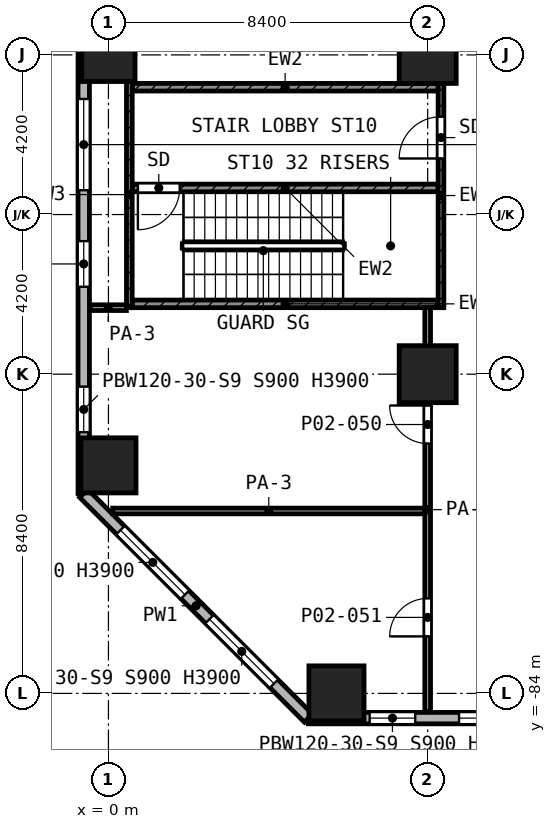
"""IFC4 building model, lengths in metres.
Left out: names, types, materials, properties, quantities, classifications, styles, units other than length and angle.
Written with IfcOpenShell. Run it as: python <this file> out.ifc"""

import sys

from ifc_helpers import new_model, si_unit, direction, frame, frame_2d, origin, origin_2d, place, context, subcontext, project, spatial, rectangle, extrude, element, fill, save


model = new_model("IFC4")
c1 = context("Model", 3, precision=1e-05, world=origin(), true_north=direction((0.0, 1.0)))
c2 = subcontext(c1, "Body", "Model", "MODEL_VIEW")
j1 = project(units=[si_unit("LENGTHUNIT", "METRE"), si_unit("PLANEANGLEUNIT", "RADIAN")], contexts=[c1])
p1 = place(None, origin())
s1 = spatial("IfcSite", under=j1, at=p1, CompositionType="ELEMENT")
p2 = place(p1, origin())
s2 = spatial("IfcBuilding", under=s1, at=p2, CompositionType="ELEMENT")
p3 = place(p2, frame((0.0, 0.0, 7.0)))
s3 = spatial("IfcBuildingStorey", under=s2, at=p3, CompositionType="ELEMENT", Elevation=7.0)
p4 = place(p3, frame((0.0, -67.2, 0.0), z_axis=(0.0, 0.0, 1.0), x_axis=(1.0, 0.0, 0.0)))
e1 = element("IfcColumn", 1, at=p4, inside=s3, PredefinedType="COLUMN", context=c2, shape_type="SweptSolid", body=[
    extrude(rectangle(XDim=1.4, YDim=1.4, at=origin_2d()), origin(), (0.0, 0.0, 1.0), 5.6),
])
for number, where, z_axis, x_axis in (
    (2, (8.4, -67.2, 0.0), (0.0, 0.0, 1.0), (1.0, 0.0, 0.0)),
    (3, (8.4, -75.6, 0.0), (0.0, 0.0, 1.0), (1.0, 0.0, 0.0)),
):
    element("IfcColumn", number, at=place(p3, frame(where, z_axis=z_axis, x_axis=x_axis)), inside=s3, PredefinedType="COLUMN", context=c2, shape_type="SweptSolid", body=[
        extrude(rectangle(XDim=1.5, YDim=1.5, at=origin_2d()), origin(), (0.0, 0.0, 1.0), 5.6),
    ])
for number, where, z_axis, x_axis in (
    (4, (0.0, -78.0, 0.0), (0.0, 0.0, 1.0), (1.0, 0.0, 0.0)),
    (5, (6.0, -84.0, 0.0), (0.0, 0.0, 1.0), (1.0, 0.0, 0.0)),
):
    element("IfcColumn", number, at=place(p3, frame(where, z_axis=z_axis, x_axis=x_axis)), inside=s3, PredefinedType="COLUMN", context=c2, shape_type="SweptSolid", body=[
        extrude(rectangle(XDim=1.45, YDim=1.45, at=origin_2d()), origin(), (0.0, 0.0, 1.0), 5.6),
    ])
p5 = place(p3, frame((-0.65, -5.262, 0.0), z_axis=(0.0, 0.0, 1.0), x_axis=(0.0, -1.0, 0.0)))
e6 = element("IfcWall", 6, at=p5, inside=s3, PredefinedType="SOLIDWALL", context=c2, shape_type="SweptSolid", body=[
    extrude(rectangle(XDim=73.476, YDim=0.3, at=frame_2d((36.738, 0.0))), origin(), (0.0, 0.0, 1.0), 5.25),
])
p6 = place(p5, frame((1.61, 0.0, 0.9)))
e7 = element("IfcOpeningElement", 7, at=p6, cuts=e6, PredefinedType="OPENING", context=c2, shape_type="SweptSolid", body=[
    extrude(rectangle(XDim=1.2, YDim=3.0, at=frame_2d((0.6, 1.5))), frame((0.0, 0.16, 0.0), z_axis=(0.0, -1.0, 0.0), x_axis=(1.0, 0.0, 0.0)), (0.0, 0.0, 1.0), 0.32),
])
p7 = place(p5, frame((4.123, 0.0, 0.9)))
e8 = element("IfcOpeningElement", 8, at=p7, cuts=e6, PredefinedType="OPENING", context=c2, shape_type="SweptSolid", body=[
    extrude(rectangle(XDim=2.4, YDim=3.0, at=frame_2d((1.2, 1.5))), frame((0.0, 0.16, 0.0), z_axis=(0.0, -1.0, 0.0), x_axis=(1.0, 0.0, 0.0)), (0.0, 0.0, 1.0), 0.32),
])
p8 = place(p5, frame((7.978, 0.0, 0.9)))
e9 = element("IfcOpeningElement", 9, at=p8, cuts=e6, PredefinedType="OPENING", context=c2, shape_type="SweptSolid", body=[
    extrude(rectangle(XDim=2.4, YDim=3.0, at=frame_2d((1.2, 1.5))), frame((0.0, 0.16, 0.0), z_axis=(0.0, -1.0, 0.0), x_axis=(1.0, 0.0, 0.0)), (0.0, 0.0, 1.0), 0.32),
])
p9 = place(p5, frame((12.698, 0.0, 0.9)))
e10 = element("IfcOpeningElement", 10, at=p9, cuts=e6, PredefinedType="OPENING", context=c2, shape_type="SweptSolid", body=[
    extrude(rectangle(XDim=2.4, YDim=3.0, at=frame_2d((1.2, 1.5))), frame((0.0, 0.16, 0.0), z_axis=(0.0, -1.0, 0.0), x_axis=(1.0, 0.0, 0.0)), (0.0, 0.0, 1.0), 0.32),
])
p10 = place(p5, frame((16.378, 0.0, 0.9)))
e11 = element("IfcOpeningElement", 11, at=p10, cuts=e6, PredefinedType="OPENING", context=c2, shape_type="SweptSolid", body=[
    extrude(rectangle(XDim=2.4, YDim=3.0, at=frame_2d((1.2, 1.5))), frame((0.0, 0.16, 0.0), z_axis=(0.0, -1.0, 0.0), x_axis=(1.0, 0.0, 0.0)), (0.0, 0.0, 1.0), 0.32),
])
p11 = place(p5, frame((21.098, 0.0, 0.9)))
e12 = element("IfcOpeningElement", 12, at=p11, cuts=e6, PredefinedType="OPENING", context=c2, shape_type="SweptSolid", body=[
    extrude(rectangle(XDim=2.4, YDim=3.0, at=frame_2d((1.2, 1.5))), frame((0.0, 0.16, 0.0), z_axis=(0.0, -1.0, 0.0), x_axis=(1.0, 0.0, 0.0)), (0.0, 0.0, 1.0), 0.32),
])
p12 = place(p5, frame((24.863, 0.0, 0.9)))
e13 = element("IfcOpeningElement", 13, at=p12, cuts=e6, PredefinedType="OPENING", context=c2, shape_type="SweptSolid", body=[
    extrude(rectangle(XDim=2.4, YDim=3.0, at=frame_2d((1.2, 1.5))), frame((0.0, 0.16, 0.0), z_axis=(0.0, -1.0, 0.0), x_axis=(1.0, 0.0, 0.0)), (0.0, 0.0, 1.0), 0.32),
])
p13 = place(p5, frame((29.623, 0.0, 0.9)))
e14 = element("IfcOpeningElement", 14, at=p13, cuts=e6, PredefinedType="OPENING", context=c2, shape_type="SweptSolid", body=[
    extrude(rectangle(XDim=2.4, YDim=3.0, at=frame_2d((1.2, 1.5))), frame((0.0, 0.16, 0.0), z_axis=(0.0, -1.0, 0.0), x_axis=(1.0, 0.0, 0.0)), (0.0, 0.0, 1.0), 0.32),
])
p14 = place(p5, frame((33.178, 0.0, 0.9)))
e15 = element("IfcOpeningElement", 15, at=p14, cuts=e6, PredefinedType="OPENING", context=c2, shape_type="SweptSolid", body=[
    extrude(rectangle(XDim=2.4, YDim=3.0, at=frame_2d((1.2, 1.5))), frame((0.0, 0.16, 0.0), z_axis=(0.0, -1.0, 0.0), x_axis=(1.0, 0.0, 0.0)), (0.0, 0.0, 1.0), 0.32),
])
p15 = place(p5, frame((37.898, 0.0, 0.9)))
e16 = element("IfcOpeningElement", 16, at=p15, cuts=e6, PredefinedType="OPENING", context=c2, shape_type="SweptSolid", body=[
    extrude(rectangle(XDim=2.4, YDim=3.0, at=frame_2d((1.2, 1.5))), frame((0.0, 0.16, 0.0), z_axis=(0.0, -1.0, 0.0), x_axis=(1.0, 0.0, 0.0)), (0.0, 0.0, 1.0), 0.32),
])
p16 = place(p5, frame((41.578, 0.0, 0.9)))
e17 = element("IfcOpeningElement", 17, at=p16, cuts=e6, PredefinedType="OPENING", context=c2, shape_type="SweptSolid", body=[
    extrude(rectangle(XDim=2.4, YDim=3.0, at=frame_2d((1.2, 1.5))), frame((0.0, 0.16, 0.0), z_axis=(0.0, -1.0, 0.0), x_axis=(1.0, 0.0, 0.0)), (0.0, 0.0, 1.0), 0.32),
])
p17 = place(p5, frame((46.298, 0.0, 0.9)))
e18 = element("IfcOpeningElement", 18, at=p17, cuts=e6, PredefinedType="OPENING", context=c2, shape_type="SweptSolid", body=[
    extrude(rectangle(XDim=2.4, YDim=3.0, at=frame_2d((1.2, 1.5))), frame((0.0, 0.16, 0.0), z_axis=(0.0, -1.0, 0.0), x_axis=(1.0, 0.0, 0.0)), (0.0, 0.0, 1.0), 0.32),
])
p18 = place(p5, frame((50.213, 0.0, 0.9)))
e19 = element("IfcOpeningElement", 19, at=p18, cuts=e6, PredefinedType="OPENING", context=c2, shape_type="SweptSolid", body=[
    extrude(rectangle(XDim=2.4, YDim=3.0, at=frame_2d((1.2, 1.5))), frame((0.0, 0.16, 0.0), z_axis=(0.0, -1.0, 0.0), x_axis=(1.0, 0.0, 0.0)), (0.0, 0.0, 1.0), 0.32),
])
p19 = place(p5, frame((54.613, 0.0, 0.9)))
e20 = element("IfcOpeningElement", 20, at=p19, cuts=e6, PredefinedType="OPENING", context=c2, shape_type="SweptSolid", body=[
    extrude(rectangle(XDim=2.4, YDim=3.0, at=frame_2d((1.2, 1.5))), frame((0.0, 0.16, 0.0), z_axis=(0.0, -1.0, 0.0), x_axis=(1.0, 0.0, 0.0)), (0.0, 0.0, 1.0), 0.32),
])
p20 = place(p5, frame((58.378, 0.0, 0.9)))
e21 = element("IfcOpeningElement", 21, at=p20, cuts=e6, PredefinedType="OPENING", context=c2, shape_type="SweptSolid", body=[
    extrude(rectangle(XDim=2.4, YDim=3.0, at=frame_2d((1.2, 1.5))), frame((0.0, 0.16, 0.0), z_axis=(0.0, -1.0, 0.0), x_axis=(1.0, 0.0, 0.0)), (0.0, 0.0, 1.0), 0.32),
])
p21 = place(p5, frame((63.098, 0.0, 0.9)))
e22 = element("IfcOpeningElement", 22, at=p21, cuts=e6, PredefinedType="OPENING", context=c2, shape_type="SweptSolid", body=[
    extrude(rectangle(XDim=2.4, YDim=3.0, at=frame_2d((1.2, 1.5))), frame((0.0, 0.16, 0.0), z_axis=(0.0, -1.0, 0.0), x_axis=(1.0, 0.0, 0.0)), (0.0, 0.0, 1.0), 0.32),
])
p22 = place(p5, frame((66.838, 0.0, 0.9)))
e23 = element("IfcOpeningElement", 23, at=p22, cuts=e6, PredefinedType="OPENING", context=c2, shape_type="SweptSolid", body=[
    extrude(rectangle(XDim=1.2, YDim=3.0, at=frame_2d((0.6, 1.5))), frame((0.0, 0.16, 0.0), z_axis=(0.0, -1.0, 0.0), x_axis=(1.0, 0.0, 0.0)), (0.0, 0.0, 1.0), 0.32),
])
p23 = place(p5, frame((70.665, 0.0, 0.9)))
e24 = element("IfcOpeningElement", 24, at=p23, cuts=e6, PredefinedType="OPENING", context=c2, shape_type="SweptSolid", body=[
    extrude(rectangle(XDim=1.2, YDim=3.0, at=frame_2d((0.6, 1.5))), frame((0.0, 0.16, 0.0), z_axis=(0.0, -1.0, 0.0), x_axis=(1.0, 0.0, 0.0)), (0.0, 0.0, 1.0), 0.32),
])
p24 = place(p3, frame((-0.65, -78.738, 0.0), z_axis=(0.0, 0.0, 1.0), x_axis=(0.707106781187, -0.707106781187, 0.0)))
e25 = element("IfcWall", 25, at=p24, inside=s3, PredefinedType="SOLIDWALL", context=c2, shape_type="SweptSolid", body=[
    extrude(rectangle(XDim=8.361, YDim=0.3, at=frame_2d((4.181, 0.0))), origin(), (0.0, 0.0, 1.0), 5.25),
])
p25 = place(p24, frame((1.367, 0.0, 0.9)))
e26 = element("IfcOpeningElement", 26, at=p25, cuts=e25, PredefinedType="OPENING", context=c2, shape_type="SweptSolid", body=[
    extrude(rectangle(XDim=2.4, YDim=3.0, at=frame_2d((1.2, 1.5))), frame((0.0, 0.16, 0.0), z_axis=(0.0, -1.0, 0.0), x_axis=(1.0, 0.0, 0.0)), (0.0, 0.0, 1.0), 0.32),
])
p26 = place(p24, frame((4.679, 0.0, 0.9)))
e27 = element("IfcOpeningElement", 27, at=p26, cuts=e25, PredefinedType="OPENING", context=c2, shape_type="SweptSolid", body=[
    extrude(rectangle(XDim=2.4, YDim=3.0, at=frame_2d((1.2, 1.5))), frame((0.0, 0.16, 0.0), z_axis=(0.0, -1.0, 0.0), x_axis=(1.0, 0.0, 0.0)), (0.0, 0.0, 1.0), 0.32),
])
p27 = place(p3, frame((5.262, -84.65, 0.0), z_axis=(0.0, 0.0, 1.0), x_axis=(1.0, 0.0, 0.0)))
e28 = element("IfcWall", 28, at=p27, inside=s3, PredefinedType="SOLIDWALL", context=c2, shape_type="SweptSolid", body=[
    extrude(rectangle(XDim=23.076, YDim=0.3, at=frame_2d((11.538, 0.0))), origin(), (0.0, 0.0, 1.0), 5.25),
])
p28 = place(p27, frame((1.61, 0.0, 0.9)))
e29 = element("IfcOpeningElement", 29, at=p28, cuts=e28, PredefinedType="OPENING", context=c2, shape_type="SweptSolid", body=[
    extrude(rectangle(XDim=1.2, YDim=3.0, at=frame_2d((0.6, 1.5))), frame((0.0, 0.16, 0.0), z_axis=(0.0, -1.0, 0.0), x_axis=(1.0, 0.0, 0.0)), (0.0, 0.0, 1.0), 0.32),
])
p29 = place(p27, frame((3.963, 0.0, 0.9)))
e30 = element("IfcOpeningElement", 30, at=p29, cuts=e28, PredefinedType="OPENING", context=c2, shape_type="SweptSolid", body=[
    extrude(rectangle(XDim=1.2, YDim=3.0, at=frame_2d((0.6, 1.5))), frame((0.0, 0.16, 0.0), z_axis=(0.0, -1.0, 0.0), x_axis=(1.0, 0.0, 0.0)), (0.0, 0.0, 1.0), 0.32),
])
p30 = place(p27, frame((7.978, 0.0, 0.9)))
e31 = element("IfcOpeningElement", 31, at=p30, cuts=e28, PredefinedType="OPENING", context=c2, shape_type="SweptSolid", body=[
    extrude(rectangle(XDim=2.4, YDim=3.0, at=frame_2d((1.2, 1.5))), frame((0.0, 0.16, 0.0), z_axis=(0.0, -1.0, 0.0), x_axis=(1.0, 0.0, 0.0)), (0.0, 0.0, 1.0), 0.32),
])
p31 = place(p27, frame((12.698, 0.0, 0.9)))
e32 = element("IfcOpeningElement", 32, at=p31, cuts=e28, PredefinedType="OPENING", context=c2, shape_type="SweptSolid", body=[
    extrude(rectangle(XDim=2.4, YDim=3.0, at=frame_2d((1.2, 1.5))), frame((0.0, 0.16, 0.0), z_axis=(0.0, -1.0, 0.0), x_axis=(1.0, 0.0, 0.0)), (0.0, 0.0, 1.0), 0.32),
])
p32 = place(p27, frame((16.038, 0.0, 0.9)))
e33 = element("IfcOpeningElement", 33, at=p32, cuts=e28, PredefinedType="OPENING", context=c2, shape_type="SweptSolid", body=[
    extrude(rectangle(XDim=3.6, YDim=3.0, at=frame_2d((1.8, 1.5))), frame((0.0, 0.16, 0.0), z_axis=(0.0, -1.0, 0.0), x_axis=(1.0, 0.0, 0.0)), (0.0, 0.0, 1.0), 0.32),
])
p33 = place(p27, frame((20.265, 0.0, 0.9)))
e34 = element("IfcOpeningElement", 34, at=p33, cuts=e28, PredefinedType="OPENING", context=c2, shape_type="SweptSolid", body=[
    extrude(rectangle(XDim=1.2, YDim=3.0, at=frame_2d((0.6, 1.5))), frame((0.0, 0.16, 0.0), z_axis=(0.0, -1.0, 0.0), x_axis=(1.0, 0.0, 0.0)), (0.0, 0.0, 1.0), 0.32),
])
p34 = place(p3, frame((0.55, -73.85, 0.0), z_axis=(0.0, 0.0, 1.0), x_axis=(0.0, 1.0, 0.0)))
e35 = element("IfcWall", 35, at=p34, inside=s3, PredefinedType="SHEAR", context=c2, shape_type="SweptSolid", body=[
    extrude(rectangle(XDim=5.95, YDim=0.15, at=frame_2d((2.975, 0.0))), origin(), (0.0, 0.0, 1.0), 5.25),
])
p35 = place(p3, frame((8.75, -73.85, 0.0), z_axis=(0.0, 0.0, 1.0), x_axis=(0.0, 1.0, 0.0)))
e36 = element("IfcWall", 36, at=p35, inside=s3, PredefinedType="SHEAR", context=c2, shape_type="SweptSolid", body=[
    extrude(rectangle(XDim=5.9, YDim=0.15, at=frame_2d((2.95, 0.0))), origin(), (0.0, 0.0, 1.0), 5.25),
])
p36 = place(p35, frame((3.925, 0.0, 0.0)))
e37 = element("IfcOpeningElement", 37, at=p36, cuts=e36, PredefinedType="OPENING", context=c2, shape_type="SweptSolid", body=[
    extrude(rectangle(XDim=1.1, YDim=2.1, at=frame_2d((0.55, 1.05))), frame((0.0, 0.085, 0.0), z_axis=(0.0, -1.0, 0.0), x_axis=(1.0, 0.0, 0.0)), (0.0, 0.0, 1.0), 0.17),
])
p37 = place(p3, frame((0.625, -73.75, 0.0), z_axis=(0.0, 0.0, 1.0), x_axis=(1.0, 0.0, 0.0)))
e38 = element("IfcWall", 38, at=p37, inside=s3, PredefinedType="SHEAR", context=c2, shape_type="SweptSolid", body=[
    extrude(rectangle(XDim=8.05, YDim=0.2, at=frame_2d((4.025, 0.0))), origin(), (0.0, 0.0, 1.0), 5.25),
])
p38 = place(p3, frame((0.625, -70.7, 0.0), z_axis=(0.0, 0.0, 1.0), x_axis=(1.0, 0.0, 0.0)))
e39 = element("IfcWall", 39, at=p38, inside=s3, PredefinedType="SHEAR", context=c2, shape_type="SweptSolid", body=[
    extrude(rectangle(XDim=8.05, YDim=0.2, at=frame_2d((4.025, 0.0))), origin(), (0.0, 0.0, 1.0), 5.25),
])
p39 = place(p38, frame((0.15, 0.0, 0.0)))
e40 = element("IfcOpeningElement", 40, at=p39, cuts=e39, PredefinedType="OPENING", context=c2, shape_type="SweptSolid", body=[
    extrude(rectangle(XDim=1.1, YDim=2.1, at=frame_2d((0.55, 1.05))), frame((0.0, 0.11, 0.0), z_axis=(0.0, -1.0, 0.0), x_axis=(1.0, 0.0, 0.0)), (0.0, 0.0, 1.0), 0.22),
])
p40 = place(p3, frame((0.625, -68.05, 0.0), z_axis=(0.0, 0.0, 1.0), x_axis=(1.0, 0.0, 0.0)))
e41 = element("IfcWall", 41, at=p40, inside=s3, PredefinedType="SHEAR", context=c2, shape_type="SweptSolid", body=[
    extrude(rectangle(XDim=8.05, YDim=0.2, at=frame_2d((4.025, 0.0))), origin(), (0.0, 0.0, 1.0), 5.25),
])
p41 = place(p3, frame((0.113, -79.2, 0.0), z_axis=(0.0, 0.0, 1.0), x_axis=(1.0, 0.0, 0.0)))
e42 = element("IfcWall", 42, at=p41, inside=s3, PredefinedType="PARTITIONING", context=c2, shape_type="SweptSolid", body=[
    extrude(rectangle(XDim=8.212, YDim=0.15, at=frame_2d((4.106, 0.0))), origin(), (0.0, 0.0, 1.0), 3.85),
])
p42 = place(p3, frame((-0.48, -73.85, 0.0), z_axis=(0.0, 0.0, 1.0), x_axis=(1.0, 0.0, 0.0)))
e43 = element("IfcWall", 43, at=p42, inside=s3, PredefinedType="PARTITIONING", context=c2, shape_type="SweptSolid", body=[
    extrude(rectangle(XDim=0.953, YDim=0.15, at=frame_2d((0.477, 0.0))), origin(), (0.0, 0.0, 1.0), 3.85),
])
p43 = place(p3, frame((8.4, -84.48, 0.0), z_axis=(0.0, 0.0, 1.0), x_axis=(0.0, 1.0, 0.0)))
e44 = element("IfcWall", 44, at=p43, inside=s3, PredefinedType="PARTITIONING", context=c2, shape_type="SweptSolid", body=[
    extrude(rectangle(XDim=10.63, YDim=0.15, at=frame_2d((5.315, 0.0))), origin(), (0.0, 0.0, 1.0), 3.85),
])
p44 = place(p43, frame((7.055, 0.0, 0.0)))
e45 = element("IfcOpeningElement", 45, at=p44, cuts=e44, PredefinedType="OPENING", context=c2, shape_type="SweptSolid", body=[
    extrude(rectangle(XDim=1.0, YDim=2.1, at=frame_2d((0.5, 1.05))), frame((0.0, 0.085, 0.0), z_axis=(0.0, -1.0, 0.0), x_axis=(1.0, 0.0, 0.0)), (0.0, 0.0, 1.0), 0.17),
])
p45 = place(p43, frame((1.98, 0.0, 0.0)))
e46 = element("IfcOpeningElement", 46, at=p45, cuts=e44, PredefinedType="OPENING", context=c2, shape_type="SweptSolid", body=[
    extrude(rectangle(XDim=1.0, YDim=2.1, at=frame_2d((0.5, 1.05))), frame((0.0, 0.085, 0.0), z_axis=(0.0, -1.0, 0.0), x_axis=(1.0, 0.0, 0.0)), (0.0, 0.0, 1.0), 0.17),
])
p46 = place(p3, frame((8.4, -67.947, 0.0), z_axis=(0.0, 0.0, 1.0), x_axis=(0.0, 1.0, 0.0)))
e47 = element("IfcWall", 47, at=p46, inside=s3, PredefinedType="PARTITIONING", context=c2, shape_type="SweptSolid", body=[
    extrude(rectangle(XDim=25.597, YDim=0.15, at=frame_2d((12.798, 0.0))), origin(), (0.0, 0.0, 1.0), 5.25),
])
p47 = place(p46, frame((19.147, 0.0, 0.0)))
e48 = element("IfcOpeningElement", 48, at=p47, cuts=e47, PredefinedType="OPENING", context=c2, shape_type="SweptSolid", body=[
    extrude(rectangle(XDim=1.0, YDim=2.1, at=frame_2d((0.5, 1.05))), frame((0.0, 0.085, 0.0), z_axis=(0.0, -1.0, 0.0), x_axis=(1.0, 0.0, 0.0)), (0.0, 0.0, 1.0), 0.17),
])
p48 = place(p46, frame((14.647, 0.0, 0.0)))
e49 = element("IfcOpeningElement", 49, at=p48, cuts=e47, PredefinedType="OPENING", context=c2, shape_type="SweptSolid", body=[
    extrude(rectangle(XDim=1.0, YDim=2.1, at=frame_2d((0.5, 1.05))), frame((0.0, 0.085, 0.0), z_axis=(0.0, -1.0, 0.0), x_axis=(1.0, 0.0, 0.0)), (0.0, 0.0, 1.0), 0.17),
])
p49 = place(p46, frame((10.447, 0.0, 0.0)))
e50 = element("IfcOpeningElement", 50, at=p49, cuts=e47, PredefinedType="OPENING", context=c2, shape_type="SweptSolid", body=[
    extrude(rectangle(XDim=1.0, YDim=2.1, at=frame_2d((0.5, 1.05))), frame((0.0, 0.085, 0.0), z_axis=(0.0, -1.0, 0.0), x_axis=(1.0, 0.0, 0.0)), (0.0, 0.0, 1.0), 0.17),
])
p50 = place(p46, frame((6.697, 0.0, 0.0)))
e51 = element("IfcOpeningElement", 51, at=p50, cuts=e47, PredefinedType="OPENING", context=c2, shape_type="SweptSolid", body=[
    extrude(rectangle(XDim=1.0, YDim=2.1, at=frame_2d((0.5, 1.05))), frame((0.0, 0.085, 0.0), z_axis=(0.0, -1.0, 0.0), x_axis=(1.0, 0.0, 0.0)), (0.0, 0.0, 1.0), 0.17),
])
p51 = place(p46, frame((2.124, 0.0, 0.0)))
e52 = element("IfcOpeningElement", 52, at=p51, cuts=e47, PredefinedType="OPENING", context=c2, shape_type="SweptSolid", body=[
    extrude(rectangle(XDim=1.0, YDim=2.1, at=frame_2d((0.5, 1.05))), frame((0.0, 0.085, 0.0), z_axis=(0.0, -1.0, 0.0), x_axis=(1.0, 0.0, 0.0)), (0.0, 0.0, 1.0), 0.17),
])
p52 = place(p21, origin())
e53 = element("IfcWindow", 53, at=p52, inside=s3, PartitioningType="SINGLE_PANEL", PredefinedType="WINDOW", context=c2, shape_type="SweptSolid", body=[
    extrude(rectangle(XDim=2.4, YDim=3.0, at=frame_2d((1.2, 1.5))), frame((0.0, 0.03, 0.0), z_axis=(0.0, -1.0, 0.0), x_axis=(1.0, 0.0, 0.0)), (0.0, 0.0, 1.0), 0.06),
])
fill(e22, e53)
p53 = place(p22, origin())
e54 = element("IfcWindow", 54, at=p53, inside=s3, PartitioningType="SINGLE_PANEL", PredefinedType="WINDOW", context=c2, shape_type="SweptSolid", body=[
    extrude(rectangle(XDim=1.2, YDim=3.0, at=frame_2d((0.6, 1.5))), frame((0.0, 0.03, 0.0), z_axis=(0.0, -1.0, 0.0), x_axis=(1.0, 0.0, 0.0)), (0.0, 0.0, 1.0), 0.06),
])
fill(e23, e54)
p54 = place(p23, origin())
e55 = element("IfcWindow", 55, at=p54, inside=s3, PartitioningType="SINGLE_PANEL", PredefinedType="WINDOW", context=c2, shape_type="SweptSolid", body=[
    extrude(rectangle(XDim=1.2, YDim=3.0, at=frame_2d((0.6, 1.5))), frame((0.0, 0.03, 0.0), z_axis=(0.0, -1.0, 0.0), x_axis=(1.0, 0.0, 0.0)), (0.0, 0.0, 1.0), 0.06),
])
fill(e24, e55)
p55 = place(p25, origin())
e56 = element("IfcWindow", 56, at=p55, inside=s3, PartitioningType="SINGLE_PANEL", PredefinedType="WINDOW", context=c2, shape_type="SweptSolid", body=[
    extrude(rectangle(XDim=2.4, YDim=3.0, at=frame_2d((1.2, 1.5))), frame((0.0, 0.03, 0.0), z_axis=(0.0, -1.0, 0.0), x_axis=(1.0, 0.0, 0.0)), (0.0, 0.0, 1.0), 0.06),
])
fill(e26, e56)
p56 = place(p26, origin())
e57 = element("IfcWindow", 57, at=p56, inside=s3, PartitioningType="SINGLE_PANEL", PredefinedType="WINDOW", context=c2, shape_type="SweptSolid", body=[
    extrude(rectangle(XDim=2.4, YDim=3.0, at=frame_2d((1.2, 1.5))), frame((0.0, 0.03, 0.0), z_axis=(0.0, -1.0, 0.0), x_axis=(1.0, 0.0, 0.0)), (0.0, 0.0, 1.0), 0.06),
])
fill(e27, e57)
p57 = place(p28, origin())
e58 = element("IfcWindow", 58, at=p57, inside=s3, PartitioningType="SINGLE_PANEL", PredefinedType="WINDOW", context=c2, shape_type="SweptSolid", body=[
    extrude(rectangle(XDim=1.2, YDim=3.0, at=frame_2d((0.6, 1.5))), frame((0.0, 0.03, 0.0), z_axis=(0.0, -1.0, 0.0), x_axis=(1.0, 0.0, 0.0)), (0.0, 0.0, 1.0), 0.06),
])
fill(e29, e58)
p58 = place(p29, origin())
e59 = element("IfcWindow", 59, at=p58, inside=s3, PartitioningType="SINGLE_PANEL", PredefinedType="WINDOW", context=c2, shape_type="SweptSolid", body=[
    extrude(rectangle(XDim=1.2, YDim=3.0, at=frame_2d((0.6, 1.5))), frame((0.0, 0.03, 0.0), z_axis=(0.0, -1.0, 0.0), x_axis=(1.0, 0.0, 0.0)), (0.0, 0.0, 1.0), 0.06),
])
fill(e30, e59)
p59 = place(p39, frame((1.1, 0.0, 0.0), z_axis=(0.0, 0.0, 1.0), x_axis=(-1.0, 0.0, 0.0)))
e60 = element("IfcDoor", 60, at=p59, inside=s3, OperationType="SINGLE_SWING_LEFT", PredefinedType="DOOR", context=c2, shape_type="SweptSolid", body=[
    extrude(rectangle(XDim=1.1, YDim=2.1, at=frame_2d((0.55, 1.05))), frame((0.0, 0.025, 0.0), z_axis=(0.0, -1.0, 0.0), x_axis=(1.0, 0.0, 0.0)), (0.0, 0.0, 1.0), 0.05),
])
fill(e40, e60)
p60 = place(p36, origin())
e61 = element("IfcDoor", 61, at=p60, inside=s3, OperationType="SINGLE_SWING_LEFT", PredefinedType="DOOR", context=c2, shape_type="SweptSolid", body=[
    extrude(rectangle(XDim=1.1, YDim=2.1, at=frame_2d((0.55, 1.05))), frame((0.0, 0.025, 0.0), z_axis=(0.0, -1.0, 0.0), x_axis=(1.0, 0.0, 0.0)), (0.0, 0.0, 1.0), 0.05),
])
fill(e37, e61)
p61 = place(p44, origin())
e62 = element("IfcDoor", 62, at=p61, inside=s3, OperationType="SINGLE_SWING_RIGHT", PredefinedType="DOOR", context=c2, shape_type="SweptSolid", body=[
    extrude(rectangle(XDim=1.0, YDim=2.1, at=frame_2d((0.5, 1.05))), frame((0.0, 0.025, 0.0), z_axis=(0.0, -1.0, 0.0), x_axis=(1.0, 0.0, 0.0)), (0.0, 0.0, 1.0), 0.05),
])
fill(e45, e62)
p62 = place(p45, origin())
e63 = element("IfcDoor", 63, at=p62, inside=s3, OperationType="SINGLE_SWING_LEFT", PredefinedType="DOOR", context=c2, shape_type="SweptSolid", body=[
    extrude(rectangle(XDim=1.0, YDim=2.1, at=frame_2d((0.5, 1.05))), frame((0.0, 0.025, 0.0), z_axis=(0.0, -1.0, 0.0), x_axis=(1.0, 0.0, 0.0)), (0.0, 0.0, 1.0), 0.05),
])
fill(e46, e63)
save(model, sys.argv[1])
